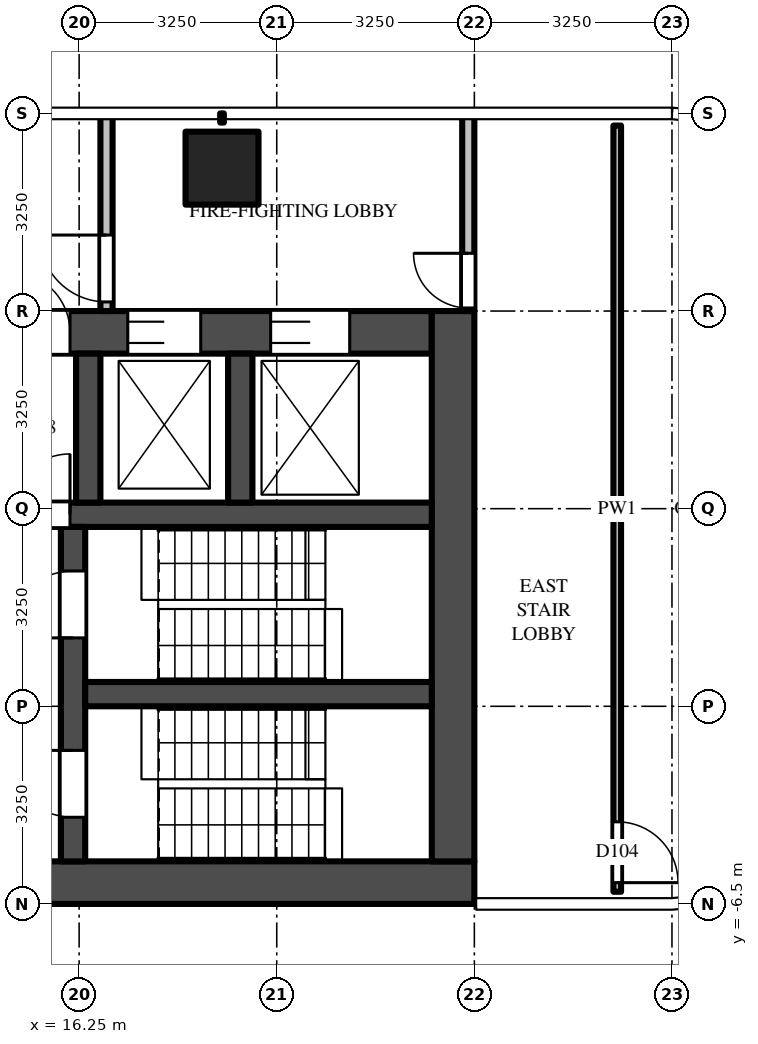
"""IFC4 building model, lengths in metres.
Left out: names, types, materials, properties, quantities, classifications, styles, units other than length and angle.
Written with IfcOpenShell. Run it as: python <this file> out.ifc"""

import sys

from ifc_helpers import new_model, si_unit, direction, frame, frame_2d, origin, origin_2d, place, context, subcontext, project, spatial, rectangle, extrude, source, transform, mapped, element, fill, save


model = new_model("IFC4")
c1 = context("Model", 3, precision=1e-05, world=origin(), true_north=direction((0.0, 1.0)))
c2 = subcontext(c1, "Body", "Model", "MODEL_VIEW")
j1 = project(units=[si_unit("LENGTHUNIT", "METRE"), si_unit("PLANEANGLEUNIT", "RADIAN")], contexts=[c1])
p1 = place(None, origin())
s1 = spatial("IfcSite", under=j1, at=p1, CompositionType="ELEMENT")
p2 = place(p1, origin())
s2 = spatial("IfcBuilding", under=s1, at=p2, CompositionType="ELEMENT")
p3 = place(p2, frame((0.0, 0.0, 162.0)))
s3 = spatial("IfcBuildingStorey", under=s2, at=p3, CompositionType="ELEMENT", Elevation=162.0)
m1 = source(origin(), c2, "Body", "SweptSolid", [
    extrude(rectangle(XDim=1.2, YDim=1.2, at=origin_2d()), origin(), (0.0, 0.0, 1.0), 3.9),
])
p4 = place(p3, frame((18.6, 5.6, 0.0), z_axis=(0.0, 0.0, 1.0), x_axis=(1.0, 0.0, 0.0)))
e1 = element("IfcColumn", 1, at=p4, inside=s3, PredefinedType="COLUMN", context=c2, shape_type="MappedRepresentation", body=[
    mapped(m1, transform((0.0, 0.0, 0.0))),
])
m2 = source(origin(), c2, "Body", "SweptSolid", [
    extrude(rectangle(XDim=16.55, YDim=0.7, at=frame_2d((8.275, 0.0))), origin(), (0.0, 0.0, 1.0), 3.7),
])
p5 = place(p3, frame((6.2, -6.15, 0.0), z_axis=(0.0, 0.0, 1.0), x_axis=(1.0, 0.0, 0.0)))
e2 = element("IfcWall", 2, at=p5, inside=s3, PredefinedType="SHEAR", context=c2, shape_type="MappedRepresentation", body=[
    mapped(m2, transform((0.0, 0.0, 0.0))),
])
m3 = source(origin(), c2, "Body", "SweptSolid", [
    extrude(rectangle(XDim=14.85, YDim=0.7, at=frame_2d((7.425, 0.0))), origin(), (0.0, 0.0, 1.0), 3.7),
])
p6 = place(p3, frame((7.2, 2.9, 0.0), z_axis=(0.0, 0.0, 1.0), x_axis=(1.0, 0.0, 0.0)))
e3 = element("IfcWall", 3, at=p6, inside=s3, PredefinedType="SHEAR", context=c2, shape_type="MappedRepresentation", body=[
    mapped(m3, transform((0.0, 0.0, 0.0))),
])
m4 = source(origin(), c2, "Body", "SweptSolid", [
    extrude(rectangle(XDim=1.1, YDim=2.1, at=frame_2d((0.55, 1.05))), frame((0.0, 0.36, 0.0), z_axis=(0.0, -1.0, 0.0), x_axis=(1.0, 0.0, 0.0)), (0.0, 0.0, 1.0), 0.72),
])
p7 = place(p6, frame((0.55, 0.0, 0.0)))
e4 = element("IfcOpeningElement", 4, at=p7, cuts=e3, PredefinedType="OPENING", context=c2, shape_type="MappedRepresentation", body=[
    mapped(m4, transform((0.0, 0.0, 0.0))),
])
p8 = place(p6, frame((3.15, 0.0, 0.0)))
e5 = element("IfcOpeningElement", 5, at=p8, cuts=e3, PredefinedType="OPENING", context=c2, shape_type="MappedRepresentation", body=[
    mapped(m4, transform((0.0, 0.0, 0.0))),
])
m5 = source(origin(), c2, "Body", "SweptSolid", [
    extrude(rectangle(XDim=1.2, YDim=2.1, at=frame_2d((0.6, 1.05))), frame((0.0, 0.36, 0.0), z_axis=(0.0, -1.0, 0.0), x_axis=(1.0, 0.0, 0.0)), (0.0, 0.0, 1.0), 0.72),
])
p9 = place(p6, frame((5.7, 0.0, 0.0)))
e6 = element("IfcOpeningElement", 6, at=p9, cuts=e3, PredefinedType="OPENING", context=c2, shape_type="MappedRepresentation", body=[
    mapped(m5, transform((0.0, 0.0, 0.0))),
])
m6 = source(origin(), c2, "Body", "SweptSolid", [
    extrude(rectangle(XDim=1.3, YDim=2.1, at=frame_2d((0.65, 1.05))), frame((0.0, 0.36, 0.0), z_axis=(0.0, -1.0, 0.0), x_axis=(1.0, 0.0, 0.0)), (0.0, 0.0, 1.0), 0.72),
])
p10 = place(p6, frame((12.2, 0.0, 0.0)))
e7 = element("IfcOpeningElement", 7, at=p10, cuts=e3, PredefinedType="OPENING", context=c2, shape_type="MappedRepresentation", body=[
    mapped(m6, transform((0.0, 0.0, 0.0))),
])
p11 = place(p6, frame((9.85, 0.0, 0.0)))
e8 = element("IfcOpeningElement", 8, at=p11, cuts=e3, PredefinedType="OPENING", context=c2, shape_type="MappedRepresentation", body=[
    mapped(m5, transform((0.0, 0.0, 0.0))),
])
m7 = source(origin(), c2, "Body", "SweptSolid", [
    extrude(rectangle(XDim=1.0, YDim=2.1, at=frame_2d((0.5, 1.05))), frame((0.0, 0.36, 0.0), z_axis=(0.0, -1.0, 0.0), x_axis=(1.0, 0.0, 0.0)), (0.0, 0.0, 1.0), 0.72),
])
p12 = place(p6, frame((7.9, 0.0, 0.0)))
e9 = element("IfcOpeningElement", 9, at=p12, cuts=e3, PredefinedType="OPENING", context=c2, shape_type="MappedRepresentation", body=[
    mapped(m7, transform((0.0, 0.0, 0.0))),
])
m8 = source(origin(), c2, "Body", "SweptSolid", [
    extrude(rectangle(XDim=9.05, YDim=0.7, at=frame_2d((4.525, 0.0))), origin(), (0.0, 0.0, 1.0), 3.7),
])
p13 = place(p3, frame((22.4, -5.8, 0.0), z_axis=(0.0, 0.0, 1.0), x_axis=(0.0, 1.0, 0.0)))
e10 = element("IfcWall", 10, at=p13, inside=s3, PredefinedType="SHEAR", context=c2, shape_type="MappedRepresentation", body=[
    mapped(m8, transform((0.0, 0.0, 0.0))),
])
m9 = source(origin(), c2, "Body", "SweptSolid", [
    extrude(rectangle(XDim=14.85, YDim=0.4, at=frame_2d((7.425, 0.0))), origin(), (0.0, 0.0, 1.0), 3.7),
])
p14 = place(p3, frame((7.2, -0.1, 0.0), z_axis=(0.0, 0.0, 1.0), x_axis=(1.0, 0.0, 0.0)))
e11 = element("IfcWall", 11, at=p14, inside=s3, PredefinedType="SHEAR", context=c2, shape_type="MappedRepresentation", body=[
    mapped(m9, transform((0.0, 0.0, 0.0))),
])
m10 = source(origin(), c2, "Body", "SweptSolid", [
    extrude(rectangle(XDim=1.0, YDim=2.1, at=frame_2d((0.5, 1.05))), frame((0.0, 0.21, 0.0), z_axis=(0.0, -1.0, 0.0), x_axis=(1.0, 0.0, 0.0)), (0.0, 0.0, 1.0), 0.42),
])
p15 = place(p14, frame((7.9, 0.0, 0.0)))
e12 = element("IfcOpeningElement", 12, at=p15, cuts=e11, PredefinedType="OPENING", context=c2, shape_type="MappedRepresentation", body=[
    mapped(m10, transform((0.0, 0.0, 0.0))),
])
m11 = source(origin(), c2, "Body", "SweptSolid", [
    extrude(rectangle(XDim=5.5, YDim=0.4, at=frame_2d((2.75, 0.0))), origin(), (0.0, 0.0, 1.0), 3.7),
])
p16 = place(p3, frame((16.15, -5.8, 0.0), z_axis=(0.0, 0.0, 1.0), x_axis=(0.0, 1.0, 0.0)))
e13 = element("IfcWall", 13, at=p16, inside=s3, PredefinedType="SHEAR", context=c2, shape_type="MappedRepresentation", body=[
    mapped(m11, transform((0.0, 0.0, 0.0))),
])
m12 = source(origin(), c2, "Body", "SweptSolid", [
    extrude(rectangle(XDim=1.1, YDim=2.1, at=frame_2d((0.55, 1.05))), frame((0.0, 0.21, 0.0), z_axis=(0.0, -1.0, 0.0), x_axis=(1.0, 0.0, 0.0)), (0.0, 0.0, 1.0), 0.42),
])
p17 = place(p16, frame((0.725, 0.0, 0.0)))
e14 = element("IfcOpeningElement", 14, at=p17, cuts=e13, PredefinedType="OPENING", context=c2, shape_type="MappedRepresentation", body=[
    mapped(m12, transform((0.0, 0.0, 0.0))),
])
p18 = place(p16, frame((3.675, 0.0, 0.0)))
e15 = element("IfcOpeningElement", 15, at=p18, cuts=e13, PredefinedType="OPENING", context=c2, shape_type="MappedRepresentation", body=[
    mapped(m12, transform((0.0, 0.0, 0.0))),
])
m13 = source(origin(), c2, "Body", "SweptSolid", [
    extrude(rectangle(XDim=5.7, YDim=0.4, at=frame_2d((2.85, 0.0))), origin(), (0.0, 0.0, 1.0), 3.7),
])
p19 = place(p3, frame((16.35, -3.05, 0.0), z_axis=(0.0, 0.0, 1.0), x_axis=(1.0, 0.0, 0.0)))
e16 = element("IfcWall", 16, at=p19, inside=s3, PredefinedType="SHEAR", context=c2, shape_type="MappedRepresentation", body=[
    mapped(m13, transform((0.0, 0.0, 0.0))),
])
m14 = source(origin(), c2, "Body", "SweptSolid", [
    extrude(rectangle(XDim=2.45, YDim=0.4, at=frame_2d((1.225, 0.0))), origin(), (0.0, 0.0, 1.0), 3.7),
])
for number, where, z_axis, x_axis in (
    (17, (16.4, 0.1, 0.0), (0.0, 0.0, 1.0), (0.0, 1.0, 0.0)),
    (18, (18.9, 0.1, 0.0), (0.0, 0.0, 1.0), (0.0, 1.0, 0.0)),
):
    element("IfcWall", number, at=place(p3, frame(where, z_axis=z_axis, x_axis=x_axis)), inside=s3, PredefinedType="SHEAR", context=c2, shape_type="MappedRepresentation", body=[
        mapped(m14, transform((0.0, 0.0, 0.0))),
    ])
m15 = source(origin(), c2, "Body", "SweptSolid", [
    extrude(rectangle(XDim=3.25, YDim=0.2, at=frame_2d((1.625, 0.0))), origin(), (0.0, 0.0, 1.0), 3.7),
])
p20 = place(p3, frame((16.7, 3.25, 0.0), z_axis=(0.0, 0.0, 1.0), x_axis=(0.0, 1.0, 0.0)))
e19 = element("IfcWall", 19, at=p20, inside=s3, PredefinedType="PARTITIONING", context=c2, shape_type="MappedRepresentation", body=[
    mapped(m15, transform((0.0, 0.0, 0.0))),
])
m16 = source(origin(), c2, "Body", "SweptSolid", [
    extrude(rectangle(XDim=1.1, YDim=2.1, at=frame_2d((0.55, 1.05))), frame((0.0, 0.11, 0.0), z_axis=(0.0, -1.0, 0.0), x_axis=(1.0, 0.0, 0.0)), (0.0, 0.0, 1.0), 0.22),
])
p21 = place(p20, frame((0.15, 0.0, 0.0)))
e20 = element("IfcOpeningElement", 20, at=p21, cuts=e19, PredefinedType="OPENING", context=c2, shape_type="MappedRepresentation", body=[
    mapped(m16, transform((0.0, 0.0, 0.0))),
])
p22 = place(p3, frame((22.65, 3.25, 0.0), z_axis=(0.0, 0.0, 1.0), x_axis=(0.0, 1.0, 0.0)))
e21 = element("IfcWall", 21, at=p22, inside=s3, PredefinedType="PARTITIONING", context=c2, shape_type="MappedRepresentation", body=[
    mapped(m15, transform((0.0, 0.0, 0.0))),
])
m17 = source(origin(), c2, "Body", "SweptSolid", [
    extrude(rectangle(XDim=0.9, YDim=2.1, at=frame_2d((0.45, 1.05))), frame((0.0, 0.11, 0.0), z_axis=(0.0, -1.0, 0.0), x_axis=(1.0, 0.0, 0.0)), (0.0, 0.0, 1.0), 0.22),
])
p23 = place(p22, frame((0.05, 0.0, 0.0)))
e22 = element("IfcOpeningElement", 22, at=p23, cuts=e21, PredefinedType="OPENING", context=c2, shape_type="MappedRepresentation", body=[
    mapped(m17, transform((0.0, 0.0, 0.0))),
])
m18 = source(origin(), c2, "Body", "SweptSolid", [
    extrude(rectangle(XDim=12.6, YDim=0.125, at=frame_2d((6.3, 0.0))), origin(), (0.0, 0.0, 1.0), 2.78),
])
p24 = place(p3, frame((25.1, 6.3, 0.0), z_axis=(0.0, 0.0, 1.0), x_axis=(0.0, -1.0, 0.0)))
e23 = element("IfcWall", 23, at=p24, inside=s3, PredefinedType="PARTITIONING", context=c2, shape_type="MappedRepresentation", body=[
    mapped(m18, transform((0.0, 0.0, 0.0))),
])
m19 = source(origin(), c2, "Body", "SweptSolid", [
    extrude(rectangle(XDim=1.0, YDim=2.1, at=frame_2d((0.5, 1.05))), frame((0.0, 0.073, 0.0), z_axis=(0.0, -1.0, 0.0), x_axis=(1.0, 0.0, 0.0)), (0.0, 0.0, 1.0), 0.145),
])
p25 = place(p24, frame((11.45, 0.0, 0.0)))
e24 = element("IfcOpeningElement", 24, at=p25, cuts=e23, PredefinedType="OPENING", context=c2, shape_type="MappedRepresentation", body=[
    mapped(m19, transform((0.0, 0.0, 0.0))),
])
m20 = source(origin(), c2, "Body", "SweptSolid", [
    extrude(rectangle(XDim=1.3, YDim=2.1, at=frame_2d((0.65, 1.05))), frame((0.0, -0.275, 0.0), z_axis=(0.0, -1.0, 0.0), x_axis=(1.0, 0.0, 0.0)), (0.0, 0.0, 1.0), 0.05),
])
p26 = place(p10, origin())
e25 = element("IfcDoor", 25, at=p26, inside=s3, OperationType="DOUBLE_DOOR_SLIDING", PredefinedType="DOOR", context=c2, shape_type="MappedRepresentation", body=[
    mapped(m20, transform((0.0, 0.0, 0.0))),
])
fill(e7, e25)
m21 = source(origin(), c2, "Body", "SweptSolid", [
    extrude(rectangle(XDim=1.2, YDim=2.1, at=frame_2d((0.6, 1.05))), frame((0.0, -0.275, 0.0), z_axis=(0.0, -1.0, 0.0), x_axis=(1.0, 0.0, 0.0)), (0.0, 0.0, 1.0), 0.05),
])
p27 = place(p11, origin())
e26 = element("IfcDoor", 26, at=p27, inside=s3, OperationType="DOUBLE_DOOR_SLIDING", PredefinedType="DOOR", context=c2, shape_type="MappedRepresentation", body=[
    mapped(m21, transform((0.0, 0.0, 0.0))),
])
fill(e8, e26)
m22 = source(origin(), c2, "Body", "SweptSolid", [
    extrude(rectangle(XDim=1.1, YDim=2.1, at=frame_2d((0.55, 1.05))), frame((0.0, 0.025, 0.0), z_axis=(0.0, -1.0, 0.0), x_axis=(1.0, 0.0, 0.0)), (0.0, 0.0, 1.0), 0.05),
])
p28 = place(p17, origin())
e27 = element("IfcDoor", 27, at=p28, inside=s3, OperationType="SINGLE_SWING_RIGHT", PredefinedType="DOOR", context=c2, shape_type="MappedRepresentation", body=[
    mapped(m22, transform((0.0, 0.0, 0.0))),
])
fill(e14, e27)
p29 = place(p18, origin())
e28 = element("IfcDoor", 28, at=p29, inside=s3, OperationType="SINGLE_SWING_LEFT", PredefinedType="DOOR", context=c2, shape_type="MappedRepresentation", body=[
    mapped(m22, transform((0.0, 0.0, 0.0))),
])
fill(e15, e28)
m23 = source(origin(), c2, "Body", "SweptSolid", [
    extrude(rectangle(XDim=1.0, YDim=2.1, at=frame_2d((0.5, 1.05))), frame((0.0, 0.025, 0.0), z_axis=(0.0, -1.0, 0.0), x_axis=(1.0, 0.0, 0.0)), (0.0, 0.0, 1.0), 0.05),
])
p30 = place(p15, origin())
e29 = element("IfcDoor", 29, at=p30, inside=s3, OperationType="SINGLE_SWING_RIGHT", PredefinedType="DOOR", context=c2, shape_type="MappedRepresentation", body=[
    mapped(m23, transform((0.0, 0.0, 0.0))),
])
fill(e12, e29)
m24 = source(origin(), c2, "Body", "SweptSolid", [
    extrude(rectangle(XDim=1.0, YDim=2.1, at=frame_2d((0.5, 1.05))), frame((0.0, -0.275, 0.0), z_axis=(0.0, -1.0, 0.0), x_axis=(1.0, 0.0, 0.0)), (0.0, 0.0, 1.0), 0.05),
])
p31 = place(p12, origin())
e30 = element("IfcDoor", 30, at=p31, inside=s3, OperationType="SINGLE_SWING_LEFT", PredefinedType="DOOR", context=c2, shape_type="MappedRepresentation", body=[
    mapped(m24, transform((0.0, 0.0, 0.0))),
])
fill(e9, e30)
p32 = place(p21, origin())
e31 = element("IfcDoor", 31, at=p32, inside=s3, OperationType="SINGLE_SWING_RIGHT", PredefinedType="DOOR", context=c2, shape_type="MappedRepresentation", body=[
    mapped(m22, transform((0.0, 0.0, 0.0))),
])
fill(e20, e31)
m25 = source(origin(), c2, "Body", "SweptSolid", [
    extrude(rectangle(XDim=0.9, YDim=2.1, at=frame_2d((0.45, 1.05))), frame((0.0, 0.025, 0.0), z_axis=(0.0, -1.0, 0.0), x_axis=(1.0, 0.0, 0.0)), (0.0, 0.0, 1.0), 0.05),
])
p33 = place(p23, origin())
e32 = element("IfcDoor", 32, at=p33, inside=s3, OperationType="SINGLE_SWING_RIGHT", PredefinedType="DOOR", context=c2, shape_type="MappedRepresentation", body=[
    mapped(m25, transform((0.0, 0.0, 0.0))),
])
fill(e22, e32)
p34 = place(p25, origin())
e33 = element("IfcDoor", 33, at=p34, inside=s3, OperationType="SINGLE_SWING_RIGHT", PredefinedType="DOOR", context=c2, shape_type="MappedRepresentation", body=[
    mapped(m23, transform((0.0, 0.0, 0.0))),
])
fill(e24, e33)
save(model, sys.argv[1])
